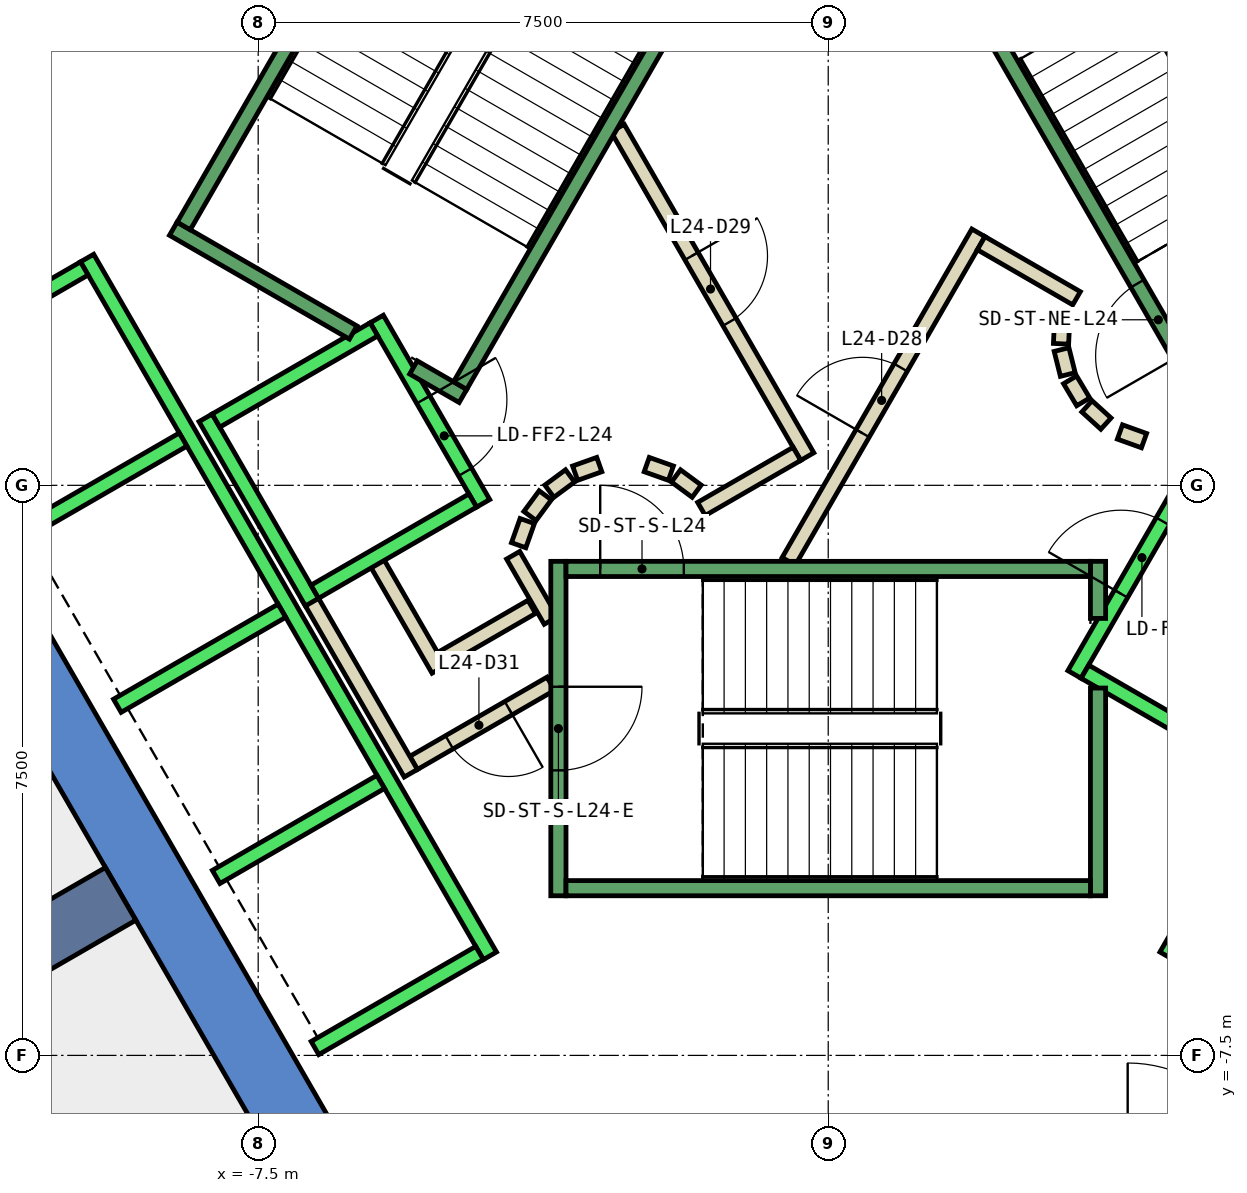
"""IFC4 building model, lengths in metres.
Left out: names, types, materials, properties, quantities, classifications, styles, units other than length and angle.
Written with IfcOpenShell. Run it as: python <this file> out.ifc"""

import sys

from ifc_helpers import new_model, si_unit, direction, frame, frame_2d, origin, place, context, subcontext, project, spatial, polyline, rectangle, outline, extrude, element, fill, save


model = new_model("IFC4")
c1 = context("Model", 3, precision=1e-05, world=origin(), true_north=direction((0.0, 1.0)))
c2 = subcontext(c1, "Body", "Model", "MODEL_VIEW")
j1 = project(units=[si_unit("LENGTHUNIT", "METRE"), si_unit("PLANEANGLEUNIT", "RADIAN")], contexts=[c1])
p1 = place(None, origin())
s1 = spatial("IfcSite", under=j1, at=p1, CompositionType="ELEMENT")
p2 = place(p1, origin())
s2 = spatial("IfcBuilding", under=s1, at=p2, CompositionType="ELEMENT")
p3 = place(p2, frame((0.0, 0.0, 111.8)))
s3 = spatial("IfcBuildingStorey", under=s2, at=p3, CompositionType="ELEMENT", Elevation=111.8)
p4 = place(p3, frame((0.0, 0.0, -0.4)))
e1 = element("IfcWall", 1, at=p4, inside=s3, PredefinedType="SHEAR", context=c2, shape_type="SweptSolid", body=[
    extrude(outline(polyline([(-12.267, 5.252), (-11.488, 4.802), (-6.409, 13.6), (-6.928, 14.5), (-12.267, 5.252)])), origin(), (0.0, 0.0, 1.0), 4.2),
])
p5 = place(p3, frame((0.0, 0.0, -0.4)))
e2 = element("IfcWall", 2, at=p5, inside=s3, PredefinedType="SHEAR", context=c2, shape_type="SweptSolid", body=[
    extrude(outline(polyline([(-13.856, 2.5), (-6.928, -9.5), (-6.409, -8.6), (-12.817, 2.5), (-13.856, 2.5)])), origin(), (0.0, 0.0, 1.0), 4.2),
])
p6 = place(p3, frame((-9.31, -5.375, -0.4), z_axis=(0.0, 0.0, 1.0), x_axis=(-0.866017533419, -0.500013631625, 0.0)))
e3 = element("IfcWall", 3, at=p6, inside=s3, PredefinedType="SHEAR", context=c2, shape_type="SweptSolid", body=[
    extrude(rectangle(XDim=9.0, YDim=0.8, at=frame_2d((4.5, 0.0))), origin(), (0.0, 0.0, 1.0), 4.2),
])
p7 = place(p3, frame((-3.9, -1.599, 0.0), z_axis=(0.0, 0.0, 1.0), x_axis=(-0.865969445389, -0.500096910261, 0.0)))
e4 = element("IfcWall", 4, at=p7, inside=s3, PredefinedType="PARTITIONING", context=c2, shape_type="SweptSolid", body=[
    extrude(rectangle(XDim=1.373, YDim=0.2, at=frame_2d((0.687, 0.0))), origin(), (0.0, 0.0, 1.0), 3.8),
])
p8 = place(p3, frame((-5.126, -2.422, 0.0), z_axis=(0.0, 0.0, 1.0), x_axis=(-0.500062241894, 0.865989465428, 0.0)))
e5 = element("IfcWall", 5, at=p8, inside=s3, PredefinedType="PARTITIONING", context=c2, shape_type="SweptSolid", body=[
    extrude(rectangle(XDim=1.7, YDim=0.2, at=frame_2d((0.85, 0.0))), origin(), (0.0, 0.0, 1.0), 3.8),
])
p9 = place(p3, frame((-3.65, -2.61, 0.0), z_axis=(0.0, 0.0, 1.0), x_axis=(-0.866072462134, -0.499918483688, 0.0)))
e6 = element("IfcWall", 6, at=p9, inside=s3, PredefinedType="PARTITIONING", context=c2, shape_type="SweptSolid", body=[
    extrude(rectangle(XDim=2.084, YDim=0.2, at=frame_2d((1.042, 0.0))), origin(), (0.0, 0.0, 1.0), 3.8),
])
p10 = place(p9, frame((0.642, 0.0, 0.0)))
e7 = element("IfcOpeningElement", 7, at=p10, cuts=e6, PredefinedType="OPENING", context=c2, shape_type="SweptSolid", body=[
    extrude(rectangle(XDim=0.9, YDim=2.1, at=frame_2d((0.45, 1.05))), frame((0.0, 0.11, 0.0), z_axis=(0.0, -1.0, 0.0), x_axis=(1.0, 0.0, 0.0)), (0.0, 0.0, 1.0), 0.22),
])
p11 = place(p3, frame((-5.492, -3.788, 0.0), z_axis=(0.0, 0.0, 1.0), x_axis=(-0.500008949224, 0.866020236886, 0.0)))
e8 = element("IfcWall", 8, at=p11, inside=s3, PredefinedType="PARTITIONING", context=c2, shape_type="SweptSolid", body=[
    extrude(rectangle(XDim=2.68, YDim=0.2, at=frame_2d((1.34, 0.0))), origin(), (0.0, 0.0, 1.0), 3.8),
])
p12 = place(p3, frame((-4.145, -0.92, 0.0), z_axis=(0.0, 0.0, 1.0), x_axis=(0.499743786207, -0.866173278362, 0.0)))
e9 = element("IfcWall", 9, at=p12, inside=s3, PredefinedType="PARTITIONING", context=c2, shape_type="SweptSolid", body=[
    extrude(rectangle(XDim=0.991, YDim=0.2, at=frame_2d((0.495, 0.0))), origin(), (0.0, 0.0, 1.0), 3.8),
])
p13 = place(p3, frame((-0.52, -1.0, 0.0), z_axis=(0.0, 0.0, 1.0), x_axis=(0.50011622646, 0.865958290007, 0.0)))
e10 = element("IfcWall", 10, at=p13, inside=s3, PredefinedType="PARTITIONING", context=c2, shape_type="SweptSolid", body=[
    extrude(rectangle(XDim=4.991, YDim=0.2, at=frame_2d((2.496, 0.0))), origin(), (0.0, 0.0, 1.0), 3.8),
])
p14 = place(p13, frame((1.945, 0.0, 0.0)))
e11 = element("IfcOpeningElement", 11, at=p14, cuts=e10, PredefinedType="OPENING", context=c2, shape_type="SweptSolid", body=[
    extrude(rectangle(XDim=1.0, YDim=2.1, at=frame_2d((0.5, 1.05))), frame((0.0, 0.11, 0.0), z_axis=(0.0, -1.0, 0.0), x_axis=(1.0, 0.0, 0.0)), (0.0, 0.0, 1.0), 0.22),
])
p15 = place(p3, frame((2.012, 3.186, 0.0), z_axis=(0.0, 0.0, 1.0), x_axis=(0.865891012941, -0.500232699559, 0.0)))
e12 = element("IfcWall", 12, at=p15, inside=s3, PredefinedType="PARTITIONING", context=c2, shape_type="SweptSolid", body=[
    extrude(rectangle(XDim=1.449, YDim=0.2, at=frame_2d((0.725, 0.0))), origin(), (0.0, 0.0, 1.0), 3.8),
])
p16 = place(p3, frame((3.079, 2.199, 0.0), z_axis=(0.0, 0.0, 1.0), x_axis=(-0.047771483479, -0.998858290933, 0.0)))
e13 = element("IfcWall", 13, at=p16, inside=s3, PredefinedType="PARTITIONING", context=c2, shape_type="SweptSolid", body=[
    extrude(rectangle(XDim=0.337, YDim=0.2, at=frame_2d((0.169, 0.0))), origin(), (0.0, 0.0, 1.0), 3.8),
])
p17 = place(p3, frame((3.07, 1.786, 0.0), z_axis=(0.0, 0.0, 1.0), x_axis=(0.242705583207, -0.970099994784, 0.0)))
e14 = element("IfcWall", 14, at=p17, inside=s3, PredefinedType="PARTITIONING", context=c2, shape_type="SweptSolid", body=[
    extrude(rectangle(XDim=0.338, YDim=0.2, at=frame_2d((0.169, 0.0))), origin(), (0.0, 0.0, 1.0), 3.8),
])
for number, where, z_axis, x_axis in (
    (15, (3.182, 1.388, 0.0), (0.0, 0.0, 1.0), (0.512, -0.859, 0.0)),
    (16, (3.404, 1.039, 0.0), (0.0, 0.0, 1.0), (0.74, -0.672, 0.0)),
):
    element("IfcWall", number, at=place(p3, frame(where, z_axis=z_axis, x_axis=x_axis)), inside=s3, PredefinedType="PARTITIONING", context=c2, shape_type="SweptSolid", body=[
        extrude(rectangle(XDim=0.338, YDim=0.2, at=frame_2d((0.169, 0.0))), origin(), (0.0, 0.0, 1.0), 3.8),
    ])
p18 = place(p3, frame((3.838, 0.702, 0.0), z_axis=(0.0, 0.0, 1.0), x_axis=(0.941035081519, -0.338308993895, 0.0)))
e17 = element("IfcWall", 17, at=p18, inside=s3, PredefinedType="PARTITIONING", context=c2, shape_type="SweptSolid", body=[
    extrude(rectangle(XDim=0.337, YDim=0.2, at=frame_2d((0.168, 0.0))), origin(), (0.0, 0.0, 1.0), 3.8),
])
p19 = place(p3, frame((-2.771, 4.7, 0.0), z_axis=(0.0, 0.0, 1.0), x_axis=(0.499969479948, -0.866043023828, 0.0)))
e18 = element("IfcWall", 18, at=p19, inside=s3, PredefinedType="PARTITIONING", context=c2, shape_type="SweptSolid", body=[
    extrude(rectangle(XDim=4.99, YDim=0.2, at=frame_2d((2.495, 0.0))), origin(), (0.0, 0.0, 1.0), 3.8),
])
p20 = place(p19, frame((1.945, 0.0, 0.0)))
e19 = element("IfcOpeningElement", 19, at=p20, cuts=e18, PredefinedType="OPENING", context=c2, shape_type="SweptSolid", body=[
    extrude(rectangle(XDim=1.0, YDim=2.1, at=frame_2d((0.5, 1.05))), frame((0.0, 0.11, 0.0), z_axis=(0.0, -1.0, 0.0), x_axis=(1.0, 0.0, 0.0)), (0.0, 0.0, 1.0), 0.22),
])
p21 = place(p3, frame((-0.412, 0.414, 0.0), z_axis=(0.0, 0.0, 1.0), x_axis=(-0.866017369001, -0.500013916395, 0.0)))
e20 = element("IfcWall", 20, at=p21, inside=s3, PredefinedType="PARTITIONING", context=c2, shape_type="SweptSolid", body=[
    extrude(rectangle(XDim=1.45, YDim=0.2, at=frame_2d((0.725, 0.0))), origin(), (0.0, 0.0, 1.0), 3.8),
])
p22 = place(p3, frame((-1.731, -0.077, 0.0), z_axis=(0.0, 0.0, 1.0), x_axis=(-0.804311165252, 0.594208338422, 0.0)))
e21 = element("IfcWall", 21, at=p22, inside=s3, PredefinedType="PARTITIONING", context=c2, shape_type="SweptSolid", body=[
    extrude(rectangle(XDim=0.338, YDim=0.2, at=frame_2d((0.169, 0.0))), origin(), (0.0, 0.0, 1.0), 3.8),
])
p23 = place(p3, frame((-2.07, 0.16, 0.0), z_axis=(0.0, 0.0, 1.0), x_axis=(-0.942199461132, 0.335052496547, 0.0)))
e22 = element("IfcWall", 22, at=p23, inside=s3, PredefinedType="PARTITIONING", context=c2, shape_type="SweptSolid", body=[
    extrude(rectangle(XDim=0.337, YDim=0.2, at=frame_2d((0.169, 0.0))), origin(), (0.0, 0.0, 1.0), 3.8),
])
p24 = place(p3, frame((-3.012, 0.273, 0.0), z_axis=(0.0, 0.0, 1.0), x_axis=(-0.942280615813, -0.334824194261, 0.0)))
e23 = element("IfcWall", 23, at=p24, inside=s3, PredefinedType="PARTITIONING", context=c2, shape_type="SweptSolid", body=[
    extrude(rectangle(XDim=0.338, YDim=0.2, at=frame_2d((0.169, 0.0))), origin(), (0.0, 0.0, 1.0), 3.8),
])
p25 = place(p3, frame((-3.397, 0.124, 0.0), z_axis=(0.0, 0.0, 1.0), x_axis=(-0.804311165252, -0.594208338422, 0.0)))
e24 = element("IfcWall", 24, at=p25, inside=s3, PredefinedType="PARTITIONING", context=c2, shape_type="SweptSolid", body=[
    extrude(rectangle(XDim=0.338, YDim=0.2, at=frame_2d((0.169, 0.0))), origin(), (0.0, 0.0, 1.0), 3.8),
])
p26 = place(p3, frame((-3.723, -0.131, 0.0), z_axis=(0.0, 0.0, 1.0), x_axis=(-0.594675113454, -0.803966112121, 0.0)))
e25 = element("IfcWall", 25, at=p26, inside=s3, PredefinedType="PARTITIONING", context=c2, shape_type="SweptSolid", body=[
    extrude(rectangle(XDim=0.338, YDim=0.2, at=frame_2d((0.169, 0.0))), origin(), (0.0, 0.0, 1.0), 3.8),
])
p27 = place(p3, frame((-3.96, -0.47, 0.0), z_axis=(0.0, 0.0, 1.0), x_axis=(-0.334824194261, -0.942280615813, 0.0)))
e26 = element("IfcWall", 26, at=p27, inside=s3, PredefinedType="PARTITIONING", context=c2, shape_type="SweptSolid", body=[
    extrude(rectangle(XDim=0.338, YDim=0.2, at=frame_2d((0.169, 0.0))), origin(), (0.0, 0.0, 1.0), 3.8),
])
p28 = place(p3, frame((-5.94, 2.188, 0.0), z_axis=(0.0, 0.0, 1.0), x_axis=(0.49994636267, -0.866056369097, 0.0)))
e27 = element("IfcWall", 27, at=p28, inside=s3, PredefinedType="STANDARD", context=c2, shape_type="SweptSolid", body=[
    extrude(rectangle(XDim=2.8, YDim=0.2, at=frame_2d((1.4, 0.0))), origin(), (0.0, 0.0, 1.0), 3.8),
])
p29 = place(p28, frame((1.225, 0.0, 0.0)))
e28 = element("IfcOpeningElement", 28, at=p29, cuts=e27, PredefinedType="OPENING", context=c2, shape_type="SweptSolid", body=[
    extrude(rectangle(XDim=1.1, YDim=2.1, at=frame_2d((0.55, 1.05))), frame((0.0, 0.11, 0.0), z_axis=(0.0, -1.0, 0.0), x_axis=(1.0, 0.0, 0.0)), (0.0, 0.0, 1.0), 0.22),
])
p30 = place(p3, frame((-8.192, 0.888, 0.0), z_axis=(0.0, 0.0, 1.0), x_axis=(0.49994636267, -0.866056369097, 0.0)))
e29 = element("IfcWall", 29, at=p30, inside=s3, PredefinedType="STANDARD", context=c2, shape_type="SweptSolid", body=[
    extrude(rectangle(XDim=2.8, YDim=0.2, at=frame_2d((1.4, 0.0))), origin(), (0.0, 0.0, 1.0), 3.8),
])
for number, where, z_axis, x_axis in (
    (30, (-5.977, 2.052, 0.0), (0.0, 0.0, 1.0), (-0.866, -0.5, 0.0)),
    (31, (-4.677, -0.2, 0.0), (0.0, 0.0, 1.0), (-0.866, -0.5, 0.0)),
):
    element("IfcWall", number, at=place(p3, frame(where, z_axis=z_axis, x_axis=x_axis)), inside=s3, PredefinedType="STANDARD", context=c2, shape_type="SweptSolid", body=[
        extrude(rectangle(XDim=2.399, YDim=0.2, at=frame_2d((1.2, 0.0))), origin(), (0.0, 0.0, 1.0), 3.8),
    ])
p31 = place(p3, frame((-9.751, 2.99, 0.0), z_axis=(0.0, 0.0, 1.0), x_axis=(0.50000090737, -0.866024879913, 0.0)))
e32 = element("IfcWall", 32, at=p31, inside=s3, PredefinedType="STANDARD", context=c2, shape_type="SweptSolid", body=[
    extrude(rectangle(XDim=10.6, YDim=0.2, at=frame_2d((5.3, 0.0))), origin(), (0.0, 0.0, 1.0), 3.8),
])
p32 = place(p3, frame((-9.788, 2.853, 0.0), z_axis=(0.0, 0.0, 1.0), x_axis=(-0.865998541277, -0.500046524342, 0.0)))
e33 = element("IfcWall", 33, at=p32, inside=s3, PredefinedType="STANDARD", context=c2, shape_type="SweptSolid", body=[
    extrude(rectangle(XDim=2.5, YDim=0.2, at=frame_2d((1.25, 0.0))), origin(), (0.0, 0.0, 1.0), 3.8),
])
for number, where, z_axis, x_axis in (
    (34, (-8.488, 0.602, 0.0), (0.0, 0.0, 1.0), (-0.866, -0.5, 0.0)),
    (35, (-7.188, -1.65, 0.0), (0.0, 0.0, 1.0), (-0.866, -0.5, 0.0)),
    (36, (-5.888, -3.902, 0.0), (0.0, 0.0, 1.0), (-0.866, -0.5, 0.0)),
    (37, (-4.588, -6.153, 0.0), (0.0, 0.0, 1.0), (-0.866, -0.5, 0.0)),
):
    element("IfcWall", number, at=place(p3, frame(where, z_axis=z_axis, x_axis=x_axis)), inside=s3, PredefinedType="STANDARD", context=c2, shape_type="SweptSolid", body=[
        extrude(rectangle(XDim=2.5, YDim=0.2, at=frame_2d((1.25, 0.0))), origin(), (0.0, 0.0, 1.0), 3.8),
    ])
p33 = place(p3, frame((3.24, -2.488, 0.0), z_axis=(0.0, 0.0, 1.0), x_axis=(0.49994636267, 0.866056369097, 0.0)))
e38 = element("IfcWall", 38, at=p33, inside=s3, PredefinedType="STANDARD", context=c2, shape_type="SweptSolid", body=[
    extrude(rectangle(XDim=2.8, YDim=0.2, at=frame_2d((1.4, 0.0))), origin(), (0.0, 0.0, 1.0), 3.8),
])
p34 = place(p33, frame((1.225, 0.0, 0.0)))
e39 = element("IfcOpeningElement", 39, at=p34, cuts=e38, PredefinedType="OPENING", context=c2, shape_type="SweptSolid", body=[
    extrude(rectangle(XDim=1.1, YDim=2.1, at=frame_2d((0.55, 1.05))), frame((0.0, 0.11, 0.0), z_axis=(0.0, -1.0, 0.0), x_axis=(1.0, 0.0, 0.0)), (0.0, 0.0, 1.0), 0.22),
])
p35 = place(p3, frame((3.377, -2.452, 0.0), z_axis=(0.0, 0.0, 1.0), x_axis=(0.865955154139, -0.50012165622, 0.0)))
e40 = element("IfcWall", 40, at=p35, inside=s3, PredefinedType="STANDARD", context=c2, shape_type="SweptSolid", body=[
    extrude(rectangle(XDim=2.4, YDim=0.2, at=frame_2d((1.2, 0.0))), origin(), (0.0, 0.0, 1.0), 3.8),
])
p36 = place(p3, frame((4.451, -6.19, 0.0), z_axis=(0.0, 0.0, 1.0), x_axis=(0.50000090737, 0.866024879913, 0.0)))
e41 = element("IfcWall", 41, at=p36, inside=s3, PredefinedType="STANDARD", context=c2, shape_type="SweptSolid", body=[
    extrude(rectangle(XDim=10.6, YDim=0.2, at=frame_2d((5.3, 0.0))), origin(), (0.0, 0.0, 1.0), 3.8),
])
p37 = place(p3, frame((-3.55, -1.0, 0.0), z_axis=(0.0, 0.0, 1.0), x_axis=(0.0, -1.0, 0.0)))
e42 = element("IfcWall", 42, at=p37, inside=s3, PredefinedType="STANDARD", context=c2, shape_type="SweptSolid", body=[
    extrude(rectangle(XDim=4.4, YDim=0.2, at=frame_2d((2.2, 0.0))), origin(), (0.0, 0.0, 1.0), 3.8),
])
p38 = place(p37, frame((1.65, 0.0, 0.0)))
e43 = element("IfcOpeningElement", 43, at=p38, cuts=e42, PredefinedType="OPENING", context=c2, shape_type="SweptSolid", body=[
    extrude(rectangle(XDim=1.1, YDim=2.2, at=frame_2d((0.55, 1.1))), frame((0.0, 0.11, 0.0), z_axis=(0.0, -1.0, 0.0), x_axis=(1.0, 0.0, 0.0)), (0.0, 0.0, 1.0), 0.22),
])
p39 = place(p3, frame((3.55, -2.667, 0.0), z_axis=(0.0, 0.0, 1.0), x_axis=(0.0, -1.0, 0.0)))
e44 = element("IfcWall", 44, at=p39, inside=s3, PredefinedType="STANDARD", context=c2, shape_type="SweptSolid", body=[
    extrude(rectangle(XDim=2.733, YDim=0.2, at=frame_2d((1.366, 0.0))), origin(), (0.0, 0.0, 1.0), 3.8),
])
p40 = place(p3, frame((3.55, -1.0, 0.0), z_axis=(0.0, 0.0, 1.0), x_axis=(0.0, -1.0, 0.0)))
e45 = element("IfcWall", 45, at=p40, inside=s3, PredefinedType="STANDARD", context=c2, shape_type="SweptSolid", body=[
    extrude(rectangle(XDim=0.751, YDim=0.2, at=frame_2d((0.375, 0.0))), origin(), (0.0, 0.0, 1.0), 3.8),
])
p41 = place(p3, frame((-3.45, -1.1, 0.0), z_axis=(0.0, 0.0, 1.0), x_axis=(1.0, 0.0, 0.0)))
e46 = element("IfcWall", 46, at=p41, inside=s3, PredefinedType="STANDARD", context=c2, shape_type="SweptSolid", body=[
    extrude(rectangle(XDim=6.9, YDim=0.2, at=frame_2d((3.45, 0.0))), origin(), (0.0, 0.0, 1.0), 3.8),
])
p42 = place(p41, frame((0.45, 0.0, 0.0)))
e47 = element("IfcOpeningElement", 47, at=p42, cuts=e46, PredefinedType="OPENING", context=c2, shape_type="SweptSolid", body=[
    extrude(rectangle(XDim=1.1, YDim=2.2, at=frame_2d((0.55, 1.1))), frame((0.0, 0.11, 0.0), z_axis=(0.0, -1.0, 0.0), x_axis=(1.0, 0.0, 0.0)), (0.0, 0.0, 1.0), 0.22),
])
p43 = place(p3, frame((-3.45, -5.3, 0.0), z_axis=(0.0, 0.0, 1.0), x_axis=(1.0, 0.0, 0.0)))
e48 = element("IfcWall", 48, at=p43, inside=s3, PredefinedType="STANDARD", context=c2, shape_type="SweptSolid", body=[
    extrude(rectangle(XDim=6.9, YDim=0.2, at=frame_2d((3.45, 0.0))), origin(), (0.0, 0.0, 1.0), 3.8),
])
p44 = place(p3, frame((4.843, 1.312, 0.0), z_axis=(0.0, 0.0, 1.0), x_axis=(-0.499963383562, 0.866046543262, 0.0)))
e49 = element("IfcWall", 49, at=p44, inside=s3, PredefinedType="STANDARD", context=c2, shape_type="SweptSolid", body=[
    extrude(rectangle(XDim=6.9, YDim=0.2, at=frame_2d((3.45, 0.0))), origin(), (0.0, 0.0, 1.0), 3.8),
])
p45 = place(p44, frame((0.45, 0.0, 0.0)))
e50 = element("IfcOpeningElement", 50, at=p45, cuts=e49, PredefinedType="OPENING", context=c2, shape_type="SweptSolid", body=[
    extrude(rectangle(XDim=1.1, YDim=2.2, at=frame_2d((0.55, 1.1))), frame((0.0, 0.11, 0.0), z_axis=(0.0, -1.0, 0.0), x_axis=(1.0, 0.0, 0.0)), (0.0, 0.0, 1.0), 0.22),
])
p46 = place(p3, frame((-6.25, 2.01, 0.0), z_axis=(0.0, 0.0, 1.0), x_axis=(-0.86611865017, 0.499838457731, 0.0)))
e51 = element("IfcWall", 51, at=p46, inside=s3, PredefinedType="STANDARD", context=c2, shape_type="SweptSolid", body=[
    extrude(rectangle(XDim=2.733, YDim=0.2, at=frame_2d((1.366, 0.0))), origin(), (0.0, 0.0, 1.0), 3.8),
])
p47 = place(p3, frame((-4.806, 1.176, 0.0), z_axis=(0.0, 0.0, 1.0), x_axis=(-0.866558586415, 0.499075361355, 0.0)))
e52 = element("IfcWall", 52, at=p47, inside=s3, PredefinedType="STANDARD", context=c2, shape_type="SweptSolid", body=[
    extrude(rectangle(XDim=0.751, YDim=0.2, at=frame_2d((0.376, 0.0))), origin(), (0.0, 0.0, 1.0), 3.8),
])
p48 = place(p3, frame((-1.393, 7.288, 0.0), z_axis=(0.0, 0.0, 1.0), x_axis=(-0.499963383562, -0.866046543262, 0.0)))
e53 = element("IfcWall", 53, at=p48, inside=s3, PredefinedType="STANDARD", context=c2, shape_type="SweptSolid", body=[
    extrude(rectangle(XDim=6.9, YDim=0.2, at=frame_2d((3.45, 0.0))), origin(), (0.0, 0.0, 1.0), 3.8),
])
p49 = place(p48, frame((0.45, 0.0, 0.0)))
e54 = element("IfcOpeningElement", 54, at=p49, cuts=e53, PredefinedType="OPENING", context=c2, shape_type="SweptSolid", body=[
    extrude(rectangle(XDim=1.1, YDim=2.2, at=frame_2d((0.55, 1.1))), frame((0.0, 0.11, 0.0), z_axis=(0.0, -1.0, 0.0), x_axis=(1.0, 0.0, 0.0)), (0.0, 0.0, 1.0), 0.22),
])
p50 = place(p3, frame((-5.03, 9.388, 0.0), z_axis=(0.0, 0.0, 1.0), x_axis=(-0.499978703459, -0.866037698999, 0.0)))
e55 = element("IfcWall", 55, at=p50, inside=s3, PredefinedType="STANDARD", context=c2, shape_type="SweptSolid", body=[
    extrude(rectangle(XDim=6.9, YDim=0.2, at=frame_2d((3.45, 0.0))), origin(), (0.0, 0.0, 1.0), 3.8),
])
p51 = place(p14, origin())
e56 = element("IfcDoor", 56, at=p51, inside=s3, OperationType="SINGLE_SWING_LEFT", PredefinedType="DOOR", context=c2, shape_type="SweptSolid", body=[
    extrude(rectangle(XDim=1.0, YDim=2.1, at=frame_2d((0.5, 1.05))), frame((0.0, 0.025, 0.0), z_axis=(0.0, -1.0, 0.0), x_axis=(1.0, 0.0, 0.0)), (0.0, 0.0, 1.0), 0.05),
])
fill(e11, e56)
p52 = place(p20, origin())
e57 = element("IfcDoor", 57, at=p52, inside=s3, OperationType="SINGLE_SWING_RIGHT", PredefinedType="DOOR", context=c2, shape_type="SweptSolid", body=[
    extrude(rectangle(XDim=1.0, YDim=2.1, at=frame_2d((0.5, 1.05))), frame((0.0, 0.025, 0.0), z_axis=(0.0, -1.0, 0.0), x_axis=(1.0, 0.0, 0.0)), (0.0, 0.0, 1.0), 0.05),
])
fill(e19, e57)
p53 = place(p10, origin())
e58 = element("IfcDoor", 58, at=p53, inside=s3, OperationType="SINGLE_SWING_LEFT", PredefinedType="DOOR", context=c2, shape_type="SweptSolid", body=[
    extrude(rectangle(XDim=0.9, YDim=2.1, at=frame_2d((0.45, 1.05))), frame((0.0, 0.025, 0.0), z_axis=(0.0, -1.0, 0.0), x_axis=(1.0, 0.0, 0.0)), (0.0, 0.0, 1.0), 0.05),
])
fill(e7, e58)
p54 = place(p34, origin())
e59 = element("IfcDoor", 59, at=p54, inside=s3, OperationType="SLIDING_TO_LEFT", PredefinedType="DOOR", context=c2, shape_type="SweptSolid", body=[
    extrude(rectangle(XDim=1.1, YDim=2.1, at=frame_2d((0.55, 1.05))), frame((0.0, 0.025, 0.0), z_axis=(0.0, -1.0, 0.0), x_axis=(1.0, 0.0, 0.0)), (0.0, 0.0, 1.0), 0.05),
])
fill(e39, e59)
p55 = place(p29, origin())
e60 = element("IfcDoor", 60, at=p55, inside=s3, OperationType="SLIDING_TO_LEFT", PredefinedType="DOOR", context=c2, shape_type="SweptSolid", body=[
    extrude(rectangle(XDim=1.1, YDim=2.1, at=frame_2d((0.55, 1.05))), frame((0.0, 0.025, 0.0), z_axis=(0.0, -1.0, 0.0), x_axis=(1.0, 0.0, 0.0)), (0.0, 0.0, 1.0), 0.05),
])
fill(e28, e60)
p56 = place(p42, origin())
e61 = element("IfcDoor", 61, at=p56, inside=s3, OperationType="SINGLE_SWING_LEFT", PredefinedType="DOOR", context=c2, shape_type="SweptSolid", body=[
    extrude(rectangle(XDim=1.1, YDim=2.2, at=frame_2d((0.55, 1.1))), frame((0.0, 0.025, 0.0), z_axis=(0.0, -1.0, 0.0), x_axis=(1.0, 0.0, 0.0)), (0.0, 0.0, 1.0), 0.05),
])
fill(e47, e61)
p57 = place(p38, origin())
e62 = element("IfcDoor", 62, at=p57, inside=s3, OperationType="SINGLE_SWING_LEFT", PredefinedType="DOOR", context=c2, shape_type="SweptSolid", body=[
    extrude(rectangle(XDim=1.1, YDim=2.2, at=frame_2d((0.55, 1.1))), frame((0.0, 0.025, 0.0), z_axis=(0.0, -1.0, 0.0), x_axis=(1.0, 0.0, 0.0)), (0.0, 0.0, 1.0), 0.05),
])
fill(e43, e62)
p58 = place(p45, origin())
e63 = element("IfcDoor", 63, at=p58, inside=s3, OperationType="SINGLE_SWING_LEFT", PredefinedType="DOOR", context=c2, shape_type="SweptSolid", body=[
    extrude(rectangle(XDim=1.1, YDim=2.2, at=frame_2d((0.55, 1.1))), frame((0.0, 0.025, 0.0), z_axis=(0.0, -1.0, 0.0), x_axis=(1.0, 0.0, 0.0)), (0.0, 0.0, 1.0), 0.05),
])
fill(e50, e63)
save(model, sys.argv[1])
